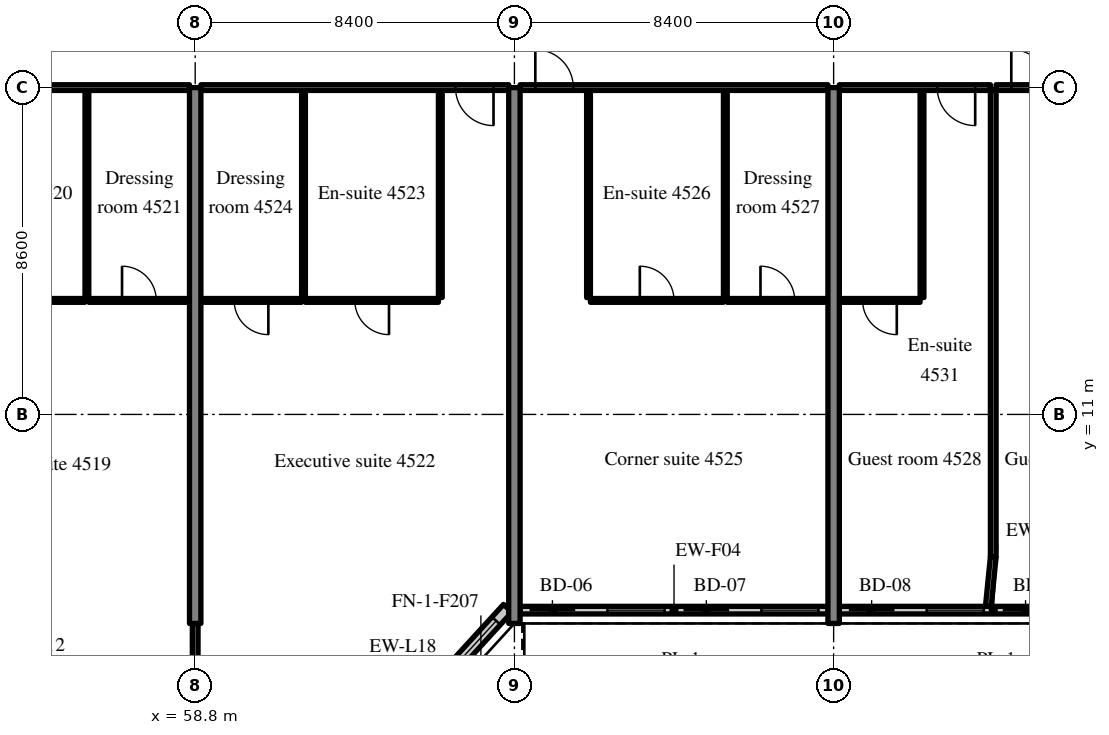
"""IFC4 building model, lengths in metres.
Left out: names, types, materials, properties, quantities, classifications, styles, units other than length and angle.
Written with IfcOpenShell. Run it as: python <this file> out.ifc"""

import sys

from ifc_helpers import new_model, si_unit, direction, frame, frame_2d, origin, place, context, subcontext, project, spatial, rectangle, extrude, source, transform, mapped, element, fill, save


model = new_model("IFC4")
c1 = context("Model", 3, precision=1e-05, world=origin(), true_north=direction((0.0, 1.0)))
c2 = subcontext(c1, "Body", "Model", "MODEL_VIEW")
j1 = project(units=[si_unit("LENGTHUNIT", "METRE"), si_unit("PLANEANGLEUNIT", "RADIAN")], contexts=[c1])
p1 = place(None, origin())
s1 = spatial("IfcSite", under=j1, at=p1, CompositionType="ELEMENT")
p2 = place(p1, origin())
s2 = spatial("IfcBuilding", under=s1, at=p2, CompositionType="ELEMENT")
p3 = place(p2, frame((0.0, 0.0, 185.8)))
s3 = spatial("IfcBuildingStorey", under=s2, at=p3, CompositionType="ELEMENT", Elevation=185.8)
m1 = source(origin(), c2, "Body", "SweptSolid", [
    extrude(rectangle(XDim=14.1, YDim=0.3, at=frame_2d((7.05, 0.0))), origin(), (0.0, 0.0, 1.0), 3.52),
])
for number, where, z_axis, x_axis in (
    (1, (58.8, 5.5, 0.0), (0.0, 0.0, 1.0), (0.0, 1.0, 0.0)),
    (2, (67.2, 5.5, 0.0), (0.0, 0.0, 1.0), (0.0, 1.0, 0.0)),
    (3, (75.6, 5.5, 0.0), (0.0, 0.0, 1.0), (0.0, 1.0, 0.0)),
):
    element("IfcWall", number, at=place(p3, frame(where, z_axis=z_axis, x_axis=x_axis)), inside=s3, PredefinedType="SHEAR", context=c2, shape_type="MappedRepresentation", body=[
        mapped(m1, transform((0.0, 0.0, 0.0), scale=1.0)),
    ])
m2 = source(origin(), c2, "Body", "SweptSolid", [
    extrude(rectangle(XDim=2.398, YDim=0.3, at=frame_2d((1.199, 0.0))), origin(), (0.0, 0.0, 1.0), 3.52),
])
p4 = place(p3, frame((65.404, 4.131, 0.0), z_axis=(0.0, 0.0, 1.0), x_axis=(0.675374189419, 0.737475222815, 0.0)))
e4 = element("IfcWall", 4, at=p4, inside=s3, PredefinedType="SOLIDWALL", context=c2, shape_type="MappedRepresentation", body=[
    mapped(m2, transform((0.0, 0.0, 0.0), scale=1.0)),
])
m3 = source(origin(), c2, "Body", "SweptSolid", [
    extrude(rectangle(XDim=1.5, YDim=2.0, at=frame_2d((0.75, 1.0))), frame((0.0, 0.16, 0.0), z_axis=(0.0, -1.0, 0.0), x_axis=(1.0, 0.0, 0.0)), (0.0, 0.0, 1.0), 0.32),
])
p5 = place(p4, frame((0.449, 0.0, 0.9)))
e5 = element("IfcOpeningElement", 5, at=p5, cuts=e4, PredefinedType="OPENING", context=c2, shape_type="MappedRepresentation", body=[
    mapped(m3, transform((0.0, 0.0, 0.0), scale=1.0)),
])
m4 = source(origin(), c2, "Body", "SweptSolid", [
    extrude(rectangle(XDim=8.1, YDim=0.2, at=frame_2d((4.05, 0.0))), origin(), (0.0, 0.0, 1.0), 2.87),
])
p6 = place(p3, frame((67.35, 5.85, 0.0), z_axis=(0.0, 0.0, 1.0), x_axis=(1.0, 0.0, 0.0)))
e6 = element("IfcWall", 6, at=p6, inside=s3, PredefinedType="SOLIDWALL", context=c2, shape_type="MappedRepresentation", body=[
    mapped(m4, transform((0.0, 0.0, 0.0), scale=1.0)),
])
m5 = source(origin(), c2, "Body", "SweptSolid", [
    extrude(rectangle(XDim=1.2, YDim=2.4, at=frame_2d((0.6, 1.2))), frame((0.0, 0.11, 0.0), z_axis=(0.0, -1.0, 0.0), x_axis=(1.0, 0.0, 0.0)), (0.0, 0.0, 1.0), 0.22),
])
p7 = place(p6, frame((0.25, 0.0, 0.0)))
e7 = element("IfcOpeningElement", 7, at=p7, cuts=e6, PredefinedType="OPENING", context=c2, shape_type="MappedRepresentation", body=[
    mapped(m5, transform((0.0, 0.0, 0.0), scale=1.0)),
])
m6 = source(origin(), c2, "Body", "SweptSolid", [
    extrude(rectangle(XDim=1.5, YDim=1.5, at=frame_2d((0.75, 0.75))), frame((0.0, 0.11, 0.0), z_axis=(0.0, -1.0, 0.0), x_axis=(1.0, 0.0, 0.0)), (0.0, 0.0, 1.0), 0.22),
])
p8 = place(p6, frame((2.3, 0.0, 0.9)))
e8 = element("IfcOpeningElement", 8, at=p8, cuts=e6, PredefinedType="OPENING", context=c2, shape_type="MappedRepresentation", body=[
    mapped(m6, transform((0.0, 0.0, 0.0), scale=1.0)),
])
p9 = place(p6, frame((4.3, 0.0, 0.0)))
e9 = element("IfcOpeningElement", 9, at=p9, cuts=e6, PredefinedType="OPENING", context=c2, shape_type="MappedRepresentation", body=[
    mapped(m5, transform((0.0, 0.0, 0.0), scale=1.0)),
])
p10 = place(p6, frame((6.35, 0.0, 0.9)))
e10 = element("IfcOpeningElement", 10, at=p10, cuts=e6, PredefinedType="OPENING", context=c2, shape_type="MappedRepresentation", body=[
    mapped(m6, transform((0.0, 0.0, 0.0), scale=1.0)),
])
m7 = source(origin(), c2, "Body", "SweptSolid", [
    extrude(rectangle(XDim=8.1, YDim=0.2, at=frame_2d((4.05, 0.0))), origin(), (0.0, 0.0, 1.0), 2.87),
])
p11 = place(p3, frame((75.75, 5.85, 0.0), z_axis=(0.0, 0.0, 1.0), x_axis=(1.0, 0.0, 0.0)))
e11 = element("IfcWall", 11, at=p11, inside=s3, PredefinedType="SOLIDWALL", context=c2, shape_type="MappedRepresentation", body=[
    mapped(m7, transform((0.0, 0.0, 0.0), scale=1.0)),
])
p12 = place(p11, frame((0.25, 0.0, 0.0)))
e12 = element("IfcOpeningElement", 12, at=p12, cuts=e11, PredefinedType="OPENING", context=c2, shape_type="MappedRepresentation", body=[
    mapped(m5, transform((0.0, 0.0, 0.0), scale=1.0)),
])
p13 = place(p11, frame((2.3, 0.0, 0.9)))
e13 = element("IfcOpeningElement", 13, at=p13, cuts=e11, PredefinedType="OPENING", context=c2, shape_type="MappedRepresentation", body=[
    mapped(m6, transform((0.0, 0.0, 0.0), scale=1.0)),
])
p14 = place(p11, frame((4.3, 0.0, 0.0)))
e14 = element("IfcOpeningElement", 14, at=p14, cuts=e11, PredefinedType="OPENING", context=c2, shape_type="MappedRepresentation", body=[
    mapped(m5, transform((0.0, 0.0, 0.0), scale=1.0)),
])
p15 = place(p11, frame((6.35, 0.0, 0.9)))
e15 = element("IfcOpeningElement", 15, at=p15, cuts=e11, PredefinedType="OPENING", context=c2, shape_type="MappedRepresentation", body=[
    mapped(m6, transform((0.0, 0.0, 0.0), scale=1.0)),
])
m8 = source(origin(), c2, "Body", "SweptSolid", [
    extrude(rectangle(XDim=5.45, YDim=0.1, at=frame_2d((2.725, 0.0))), origin(), (0.0, 0.0, 1.0), 3.52),
])
p16 = place(p3, frame((55.95, 14.075, 0.0), z_axis=(0.0, 0.0, 1.0), x_axis=(0.0, 1.0, 0.0)))
e16 = element("IfcWall", 16, at=p16, inside=s3, PredefinedType="PARTITIONING", context=c2, shape_type="MappedRepresentation", body=[
    mapped(m8, transform((0.0, 0.0, 0.0), scale=1.0)),
])
m9 = source(origin(), c2, "Body", "SweptSolid", [
    extrude(rectangle(XDim=3.5, YDim=0.1, at=frame_2d((1.75, 0.0))), origin(), (0.0, 0.0, 1.0), 3.52),
])
p17 = place(p3, frame((52.4, 14.0, 0.0), z_axis=(0.0, 0.0, 1.0), x_axis=(1.0, 0.0, 0.0)))
e17 = element("IfcWall", 17, at=p17, inside=s3, PredefinedType="PARTITIONING", context=c2, shape_type="MappedRepresentation", body=[
    mapped(m9, transform((0.0, 0.0, 0.0), scale=1.0)),
])
m10 = source(origin(), c2, "Body", "SweptSolid", [
    extrude(rectangle(XDim=0.9, YDim=2.1, at=frame_2d((0.45, 1.05))), frame((0.0, 0.06, 0.0), z_axis=(0.0, -1.0, 0.0), x_axis=(1.0, 0.0, 0.0)), (0.0, 0.0, 1.0), 0.12),
])
p18 = place(p17, frame((1.3, 0.0, 0.0)))
e18 = element("IfcOpeningElement", 18, at=p18, cuts=e17, PredefinedType="OPENING", context=c2, shape_type="MappedRepresentation", body=[
    mapped(m10, transform((0.0, 0.0, 0.0), scale=1.0)),
])
m11 = source(origin(), c2, "Body", "SweptSolid", [
    extrude(rectangle(XDim=2.65, YDim=0.1, at=frame_2d((1.325, 0.0))), origin(), (0.0, 0.0, 1.0), 3.52),
])
p19 = place(p3, frame((56.0, 14.0, 0.0), z_axis=(0.0, 0.0, 1.0), x_axis=(1.0, 0.0, 0.0)))
e19 = element("IfcWall", 19, at=p19, inside=s3, PredefinedType="PARTITIONING", context=c2, shape_type="MappedRepresentation", body=[
    mapped(m11, transform((0.0, 0.0, 0.0), scale=1.0)),
])
p20 = place(p19, frame((0.875, 0.0, 0.0)))
e20 = element("IfcOpeningElement", 20, at=p20, cuts=e19, PredefinedType="OPENING", context=c2, shape_type="MappedRepresentation", body=[
    mapped(m10, transform((0.0, 0.0, 0.0), scale=1.0)),
])
m12 = source(origin(), c2, "Body", "SweptSolid", [
    extrude(rectangle(XDim=8.1, YDim=0.15, at=frame_2d((4.05, 0.0))), origin(), (0.0, 0.0, 1.0), 2.82),
])
p21 = place(p3, frame((50.55, 19.6, 0.0), z_axis=(0.0, 0.0, 1.0), x_axis=(1.0, 0.0, 0.0)))
e21 = element("IfcWall", 21, at=p21, inside=s3, PredefinedType="PARTITIONING", context=c2, shape_type="MappedRepresentation", body=[
    mapped(m12, transform((0.0, 0.0, 0.0), scale=1.0)),
])
m13 = source(origin(), c2, "Body", "SweptSolid", [
    extrude(rectangle(XDim=1.0, YDim=2.1, at=frame_2d((0.5, 1.05))), frame((0.0, 0.085, 0.0), z_axis=(0.0, -1.0, 0.0), x_axis=(1.0, 0.0, 0.0)), (0.0, 0.0, 1.0), 0.17),
])
p22 = place(p21, frame((0.4, 0.0, 0.0)))
e22 = element("IfcOpeningElement", 22, at=p22, cuts=e21, PredefinedType="OPENING", context=c2, shape_type="MappedRepresentation", body=[
    mapped(m13, transform((0.0, 0.0, 0.0), scale=1.0)),
])
for number, where, z_axis, x_axis in (
    (23, (65.25, 14.075, 0.0), (0.0, 0.0, 1.0), (0.0, 1.0, 0.0)),
    (24, (61.65, 14.075, 0.0), (0.0, 0.0, 1.0), (0.0, 1.0, 0.0)),
):
    element("IfcWall", number, at=place(p3, frame(where, z_axis=z_axis, x_axis=x_axis)), inside=s3, PredefinedType="PARTITIONING", context=c2, shape_type="MappedRepresentation", body=[
        mapped(m8, transform((0.0, 0.0, 0.0), scale=1.0)),
    ])
p23 = place(p3, frame((61.7, 14.0, 0.0), z_axis=(0.0, 0.0, 1.0), x_axis=(1.0, 0.0, 0.0)))
e25 = element("IfcWall", 25, at=p23, inside=s3, PredefinedType="PARTITIONING", context=c2, shape_type="MappedRepresentation", body=[
    mapped(m9, transform((0.0, 0.0, 0.0), scale=1.0)),
])
p24 = place(p23, frame((1.3, 0.0, 0.0)))
e26 = element("IfcOpeningElement", 26, at=p24, cuts=e25, PredefinedType="OPENING", context=c2, shape_type="MappedRepresentation", body=[
    mapped(m10, transform((0.0, 0.0, 0.0), scale=1.0)),
])
m14 = source(origin(), c2, "Body", "SweptSolid", [
    extrude(rectangle(XDim=2.65, YDim=0.1, at=frame_2d((1.325, 0.0))), origin(), (0.0, 0.0, 1.0), 3.52),
])
p25 = place(p3, frame((58.95, 14.0, 0.0), z_axis=(0.0, 0.0, 1.0), x_axis=(1.0, 0.0, 0.0)))
e27 = element("IfcWall", 27, at=p25, inside=s3, PredefinedType="PARTITIONING", context=c2, shape_type="MappedRepresentation", body=[
    mapped(m14, transform((0.0, 0.0, 0.0), scale=1.0)),
])
p26 = place(p25, frame((0.875, 0.0, 0.0)))
e28 = element("IfcOpeningElement", 28, at=p26, cuts=e27, PredefinedType="OPENING", context=c2, shape_type="MappedRepresentation", body=[
    mapped(m10, transform((0.0, 0.0, 0.0), scale=1.0)),
])
m15 = source(origin(), c2, "Body", "SweptSolid", [
    extrude(rectangle(XDim=8.1, YDim=0.15, at=frame_2d((4.05, 0.0))), origin(), (0.0, 0.0, 1.0), 2.82),
])
p27 = place(p3, frame((58.95, 19.6, 0.0), z_axis=(0.0, 0.0, 1.0), x_axis=(1.0, 0.0, 0.0)))
e29 = element("IfcWall", 29, at=p27, inside=s3, PredefinedType="PARTITIONING", context=c2, shape_type="MappedRepresentation", body=[
    mapped(m15, transform((0.0, 0.0, 0.0), scale=1.0)),
])
p28 = place(p27, frame((6.7, 0.0, 0.0)))
e30 = element("IfcOpeningElement", 30, at=p28, cuts=e29, PredefinedType="OPENING", context=c2, shape_type="MappedRepresentation", body=[
    mapped(m13, transform((0.0, 0.0, 0.0), scale=1.0)),
])
for number, where, z_axis, x_axis in (
    (31, (69.15, 14.075, 0.0), (0.0, 0.0, 1.0), (0.0, 1.0, 0.0)),
    (32, (72.75, 14.075, 0.0), (0.0, 0.0, 1.0), (0.0, 1.0, 0.0)),
):
    element("IfcWall", number, at=place(p3, frame(where, z_axis=z_axis, x_axis=x_axis)), inside=s3, PredefinedType="PARTITIONING", context=c2, shape_type="MappedRepresentation", body=[
        mapped(m8, transform((0.0, 0.0, 0.0), scale=1.0)),
    ])
p29 = place(p3, frame((69.2, 14.0, 0.0), z_axis=(0.0, 0.0, 1.0), x_axis=(1.0, 0.0, 0.0)))
e33 = element("IfcWall", 33, at=p29, inside=s3, PredefinedType="PARTITIONING", context=c2, shape_type="MappedRepresentation", body=[
    mapped(m9, transform((0.0, 0.0, 0.0), scale=1.0)),
])
p30 = place(p29, frame((1.3, 0.0, 0.0)))
e34 = element("IfcOpeningElement", 34, at=p30, cuts=e33, PredefinedType="OPENING", context=c2, shape_type="MappedRepresentation", body=[
    mapped(m10, transform((0.0, 0.0, 0.0), scale=1.0)),
])
p31 = place(p3, frame((72.8, 14.0, 0.0), z_axis=(0.0, 0.0, 1.0), x_axis=(1.0, 0.0, 0.0)))
e35 = element("IfcWall", 35, at=p31, inside=s3, PredefinedType="PARTITIONING", context=c2, shape_type="MappedRepresentation", body=[
    mapped(m11, transform((0.0, 0.0, 0.0), scale=1.0)),
])
p32 = place(p31, frame((0.875, 0.0, 0.0)))
e36 = element("IfcOpeningElement", 36, at=p32, cuts=e35, PredefinedType="OPENING", context=c2, shape_type="MappedRepresentation", body=[
    mapped(m10, transform((0.0, 0.0, 0.0), scale=1.0)),
])
p33 = place(p3, frame((67.35, 19.6, 0.0), z_axis=(0.0, 0.0, 1.0), x_axis=(1.0, 0.0, 0.0)))
e37 = element("IfcWall", 37, at=p33, inside=s3, PredefinedType="PARTITIONING", context=c2, shape_type="MappedRepresentation", body=[
    mapped(m12, transform((0.0, 0.0, 0.0), scale=1.0)),
])
p34 = place(p33, frame((0.4, 0.0, 0.0)))
e38 = element("IfcOpeningElement", 38, at=p34, cuts=e37, PredefinedType="OPENING", context=c2, shape_type="MappedRepresentation", body=[
    mapped(m13, transform((0.0, 0.0, 0.0), scale=1.0)),
])
p35 = place(p3, frame((77.925, 14.075, 0.0), z_axis=(0.0, 0.0, 1.0), x_axis=(0.0, 1.0, 0.0)))
e39 = element("IfcWall", 39, at=p35, inside=s3, PredefinedType="PARTITIONING", context=c2, shape_type="MappedRepresentation", body=[
    mapped(m8, transform((0.0, 0.0, 0.0), scale=1.0)),
])
m16 = source(origin(), c2, "Body", "SweptSolid", [
    extrude(rectangle(XDim=2.125, YDim=0.1, at=frame_2d((1.062, 0.0))), origin(), (0.0, 0.0, 1.0), 3.52),
])
p36 = place(p3, frame((75.75, 14.0, 0.0), z_axis=(0.0, 0.0, 1.0), x_axis=(1.0, 0.0, 0.0)))
e40 = element("IfcWall", 40, at=p36, inside=s3, PredefinedType="PARTITIONING", context=c2, shape_type="MappedRepresentation", body=[
    mapped(m16, transform((0.0, 0.0, 0.0), scale=1.0)),
])
p37 = place(p36, frame((0.612, 0.0, 0.0)))
e41 = element("IfcOpeningElement", 41, at=p37, cuts=e40, PredefinedType="OPENING", context=c2, shape_type="MappedRepresentation", body=[
    mapped(m10, transform((0.0, 0.0, 0.0), scale=1.0)),
])
m17 = source(origin(), c2, "Body", "SweptSolid", [
    extrude(rectangle(XDim=3.975, YDim=0.15, at=frame_2d((1.988, 0.0))), origin(), (0.0, 0.0, 1.0), 2.82),
])
p38 = place(p3, frame((75.75, 19.6, 0.0), z_axis=(0.0, 0.0, 1.0), x_axis=(1.0, 0.0, 0.0)))
e42 = element("IfcWall", 42, at=p38, inside=s3, PredefinedType="PARTITIONING", context=c2, shape_type="MappedRepresentation", body=[
    mapped(m17, transform((0.0, 0.0, 0.0), scale=1.0)),
])
p39 = place(p38, frame((2.575, 0.0, 0.0)))
e43 = element("IfcOpeningElement", 43, at=p39, cuts=e42, PredefinedType="OPENING", context=c2, shape_type="MappedRepresentation", body=[
    mapped(m13, transform((0.0, 0.0, 0.0), scale=1.0)),
])
p40 = place(p3, frame((79.875, 19.6, 0.0), z_axis=(0.0, 0.0, 1.0), x_axis=(1.0, 0.0, 0.0)))
e44 = element("IfcWall", 44, at=p40, inside=s3, PredefinedType="PARTITIONING", context=c2, shape_type="MappedRepresentation", body=[
    mapped(m17, transform((0.0, 0.0, 0.0), scale=1.0)),
])
p41 = place(p40, frame((0.4, 0.0, 0.0)))
e45 = element("IfcOpeningElement", 45, at=p41, cuts=e44, PredefinedType="OPENING", context=c2, shape_type="MappedRepresentation", body=[
    mapped(m13, transform((0.0, 0.0, 0.0), scale=1.0)),
])
m18 = source(origin(), c2, "Body", "SweptSolid", [
    extrude(rectangle(XDim=12.275, YDim=0.15, at=frame_2d((6.137, 0.0))), origin(), (0.0, 0.0, 1.0), 3.52),
])
p42 = place(p3, frame((79.8, 7.25, 0.0), z_axis=(0.0, 0.0, 1.0), x_axis=(0.0, 1.0, 0.0)))
e46 = element("IfcWall", 46, at=p42, inside=s3, PredefinedType="PARTITIONING", context=c2, shape_type="MappedRepresentation", body=[
    mapped(m18, transform((0.0, 0.0, 0.0), scale=1.0)),
])
m19 = source(origin(), c2, "Body", "SweptSolid", [
    extrude(rectangle(XDim=2.178, YDim=0.15, at=frame_2d((1.089, 0.0))), origin(), (0.0, 0.0, 1.0), 3.52),
])
p43 = place(p3, frame((58.8, 3.322, 0.0), z_axis=(0.0, 0.0, 1.0), x_axis=(0.0, 1.0, 0.0)))
e47 = element("IfcWall", 47, at=p43, inside=s3, PredefinedType="PARTITIONING", context=c2, shape_type="MappedRepresentation", body=[
    mapped(m19, transform((0.0, 0.0, 0.0), scale=1.0)),
])
m20 = source(origin(), c2, "Body", "SweptSolid", [
    extrude(rectangle(XDim=1.307, YDim=0.15, at=frame_2d((0.653, 0.0))), origin(), (0.0, 0.0, 1.0), 3.52),
])
p44 = place(p3, frame((79.67, 5.95, 0.0), z_axis=(0.0, 0.0, 1.0), x_axis=(0.099596223396, 0.99502793543, 0.0)))
e48 = element("IfcWall", 48, at=p44, inside=s3, PredefinedType="PARTITIONING", context=c2, shape_type="MappedRepresentation", body=[
    mapped(m20, transform((0.0, 0.0, 0.0), scale=1.0)),
])
m21 = source(origin(), c2, "Body", "SweptSolid", [
    extrude(rectangle(XDim=1.5, YDim=2.0, at=frame_2d((0.75, 1.0))), frame((0.0, 0.03, 0.0), z_axis=(0.0, -1.0, 0.0), x_axis=(1.0, 0.0, 0.0)), (0.0, 0.0, 1.0), 0.06),
])
p45 = place(p5, origin())
e49 = element("IfcWindow", 49, at=p45, inside=s3, PartitioningType="SINGLE_PANEL", PredefinedType="WINDOW", context=c2, shape_type="MappedRepresentation", body=[
    mapped(m21, transform((0.0, 0.0, 0.0), scale=1.0)),
])
fill(e5, e49)
m22 = source(origin(), c2, "Body", "SweptSolid", [
    extrude(rectangle(XDim=1.2, YDim=2.4, at=frame_2d((0.6, 1.2))), frame((0.0, 0.025, 0.0), z_axis=(0.0, -1.0, 0.0), x_axis=(1.0, 0.0, 0.0)), (0.0, 0.0, 1.0), 0.05),
])
p46 = place(p7, origin())
e50 = element("IfcDoor", 50, at=p46, inside=s3, OperationType="SLIDING_TO_RIGHT", PredefinedType="DOOR", context=c2, shape_type="MappedRepresentation", body=[
    mapped(m22, transform((0.0, 0.0, 0.0), scale=1.0)),
])
fill(e7, e50)
m23 = source(origin(), c2, "Body", "SweptSolid", [
    extrude(rectangle(XDim=1.5, YDim=1.5, at=frame_2d((0.75, 0.75))), frame((0.0, 0.03, 0.0), z_axis=(0.0, -1.0, 0.0), x_axis=(1.0, 0.0, 0.0)), (0.0, 0.0, 1.0), 0.06),
])
p47 = place(p8, origin())
e51 = element("IfcWindow", 51, at=p47, inside=s3, PartitioningType="SINGLE_PANEL", PredefinedType="WINDOW", context=c2, shape_type="MappedRepresentation", body=[
    mapped(m23, transform((0.0, 0.0, 0.0), scale=1.0)),
])
fill(e8, e51)
p48 = place(p9, origin())
e52 = element("IfcDoor", 52, at=p48, inside=s3, OperationType="SLIDING_TO_LEFT", PredefinedType="DOOR", context=c2, shape_type="MappedRepresentation", body=[
    mapped(m22, transform((0.0, 0.0, 0.0), scale=1.0)),
])
fill(e9, e52)
p49 = place(p10, origin())
e53 = element("IfcWindow", 53, at=p49, inside=s3, PartitioningType="SINGLE_PANEL", PredefinedType="WINDOW", context=c2, shape_type="MappedRepresentation", body=[
    mapped(m23, transform((0.0, 0.0, 0.0), scale=1.0)),
])
fill(e10, e53)
p50 = place(p12, origin())
e54 = element("IfcDoor", 54, at=p50, inside=s3, OperationType="SLIDING_TO_RIGHT", PredefinedType="DOOR", context=c2, shape_type="MappedRepresentation", body=[
    mapped(m22, transform((0.0, 0.0, 0.0), scale=1.0)),
])
fill(e12, e54)
p51 = place(p13, origin())
e55 = element("IfcWindow", 55, at=p51, inside=s3, PartitioningType="SINGLE_PANEL", PredefinedType="WINDOW", context=c2, shape_type="MappedRepresentation", body=[
    mapped(m23, transform((0.0, 0.0, 0.0), scale=1.0)),
])
fill(e13, e55)
p52 = place(p14, origin())
e56 = element("IfcDoor", 56, at=p52, inside=s3, OperationType="SLIDING_TO_LEFT", PredefinedType="DOOR", context=c2, shape_type="MappedRepresentation", body=[
    mapped(m22, transform((0.0, 0.0, 0.0), scale=1.0)),
])
fill(e14, e56)
m24 = source(origin(), c2, "Body", "SweptSolid", [
    extrude(rectangle(XDim=0.9, YDim=2.1, at=frame_2d((0.45, 1.05))), frame((0.0, 0.025, 0.0), z_axis=(0.0, -1.0, 0.0), x_axis=(1.0, 0.0, 0.0)), (0.0, 0.0, 1.0), 0.05),
])
p53 = place(p20, origin())
e57 = element("IfcDoor", 57, at=p53, inside=s3, OperationType="SINGLE_SWING_LEFT", PredefinedType="DOOR", context=c2, shape_type="MappedRepresentation", body=[
    mapped(m24, transform((0.0, 0.0, 0.0), scale=1.0)),
])
fill(e20, e57)
p54 = place(p24, origin())
e58 = element("IfcDoor", 58, at=p54, inside=s3, OperationType="SINGLE_SWING_RIGHT", PredefinedType="DOOR", context=c2, shape_type="MappedRepresentation", body=[
    mapped(m24, transform((0.0, 0.0, 0.0), scale=1.0)),
])
fill(e26, e58)
p55 = place(p26, origin())
e59 = element("IfcDoor", 59, at=p55, inside=s3, OperationType="SINGLE_SWING_RIGHT", PredefinedType="DOOR", context=c2, shape_type="MappedRepresentation", body=[
    mapped(m24, transform((0.0, 0.0, 0.0), scale=1.0)),
])
fill(e28, e59)
m25 = source(origin(), c2, "Body", "SweptSolid", [
    extrude(rectangle(XDim=1.0, YDim=2.1, at=frame_2d((0.5, 1.05))), frame((0.0, 0.025, 0.0), z_axis=(0.0, -1.0, 0.0), x_axis=(1.0, 0.0, 0.0)), (0.0, 0.0, 1.0), 0.05),
])
p56 = place(p28, origin())
e60 = element("IfcDoor", 60, at=p56, inside=s3, OperationType="SINGLE_SWING_RIGHT", PredefinedType="DOOR", context=c2, shape_type="MappedRepresentation", body=[
    mapped(m25, transform((0.0, 0.0, 0.0), scale=1.0)),
])
fill(e30, e60)
p57 = place(p30, origin())
e61 = element("IfcDoor", 61, at=p57, inside=s3, OperationType="SINGLE_SWING_LEFT", PredefinedType="DOOR", context=c2, shape_type="MappedRepresentation", body=[
    mapped(m24, transform((0.0, 0.0, 0.0), scale=1.0)),
])
fill(e34, e61)
p58 = place(p32, origin())
e62 = element("IfcDoor", 62, at=p58, inside=s3, OperationType="SINGLE_SWING_LEFT", PredefinedType="DOOR", context=c2, shape_type="MappedRepresentation", body=[
    mapped(m24, transform((0.0, 0.0, 0.0), scale=1.0)),
])
fill(e36, e62)
p59 = place(p34, origin())
e63 = element("IfcDoor", 63, at=p59, inside=s3, OperationType="SINGLE_SWING_LEFT", PredefinedType="DOOR", context=c2, shape_type="MappedRepresentation", body=[
    mapped(m25, transform((0.0, 0.0, 0.0), scale=1.0)),
])
fill(e38, e63)
p60 = place(p37, origin())
e64 = element("IfcDoor", 64, at=p60, inside=s3, OperationType="SINGLE_SWING_RIGHT", PredefinedType="DOOR", context=c2, shape_type="MappedRepresentation", body=[
    mapped(m24, transform((0.0, 0.0, 0.0), scale=1.0)),
])
fill(e41, e64)
p61 = place(p39, origin())
e65 = element("IfcDoor", 65, at=p61, inside=s3, OperationType="SINGLE_SWING_RIGHT", PredefinedType="DOOR", context=c2, shape_type="MappedRepresentation", body=[
    mapped(m25, transform((0.0, 0.0, 0.0), scale=1.0)),
])
fill(e43, e65)
p62 = place(p41, origin())
e66 = element("IfcDoor", 66, at=p62, inside=s3, OperationType="SINGLE_SWING_LEFT", PredefinedType="DOOR", context=c2, shape_type="MappedRepresentation", body=[
    mapped(m25, transform((0.0, 0.0, 0.0), scale=1.0)),
])
fill(e45, e66)
save(model, sys.argv[1])
